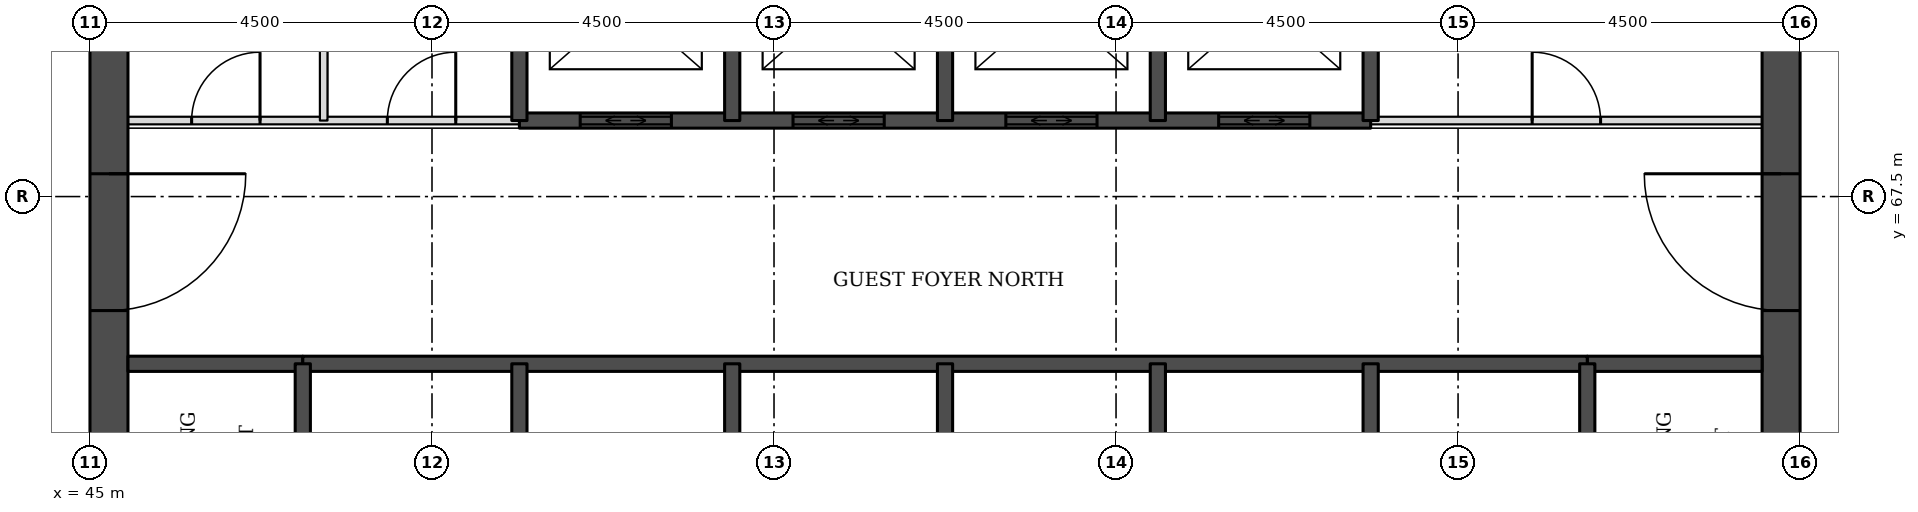
"""IFC4 building model, lengths in metres.
Left out: names, types, materials, properties, quantities, classifications, styles, units other than length and angle.
Written with IfcOpenShell. Run it as: python <this file> out.ifc"""

import sys

from ifc_helpers import new_model, si_unit, direction, frame, frame_2d, origin, place, context, subcontext, project, spatial, rectangle, extrude, element, fill, save


model = new_model("IFC4")
c1 = context("Model", 3, precision=1e-05, world=origin(), true_north=direction((0.0, 1.0)))
c2 = subcontext(c1, "Body", "Model", "MODEL_VIEW")
j1 = project(units=[si_unit("LENGTHUNIT", "METRE"), si_unit("PLANEANGLEUNIT", "RADIAN")], contexts=[c1])
p1 = place(None, origin())
s1 = spatial("IfcSite", under=j1, at=p1, CompositionType="ELEMENT")
p2 = place(p1, origin())
s2 = spatial("IfcBuilding", under=s1, at=p2, CompositionType="ELEMENT")
p3 = place(p2, frame((0.0, 0.0, 59.4)))
s3 = spatial("IfcBuildingStorey", under=s2, at=p3, CompositionType="ELEMENT", Elevation=59.4)
p4 = place(p3, frame((45.25, 49.5, 0.0), z_axis=(0.0, 0.0, 1.0), x_axis=(0.0, 1.0, 0.0)))
e1 = element("IfcWall", 1, at=p4, inside=s3, PredefinedType="SHEAR", context=c2, shape_type="SweptSolid", body=[
    extrude(rectangle(XDim=22.5, YDim=0.5, at=frame_2d((11.25, 0.0))), origin(), (0.0, 0.0, 1.0), 3.3),
])
p5 = place(p4, frame((4.2, 0.0, 0.0)))
e2 = element("IfcOpeningElement", 2, at=p5, cuts=e1, PredefinedType="OPENING", context=c2, shape_type="SweptSolid", body=[
    extrude(rectangle(XDim=1.8, YDim=2.1, at=frame_2d((0.9, 1.05))), frame((0.0, 0.26, 0.0), z_axis=(0.0, -1.0, 0.0), x_axis=(1.0, 0.0, 0.0)), (0.0, 0.0, 1.0), 0.52),
])
p6 = place(p4, frame((6.9, 0.0, 0.0)))
e3 = element("IfcOpeningElement", 3, at=p6, cuts=e1, PredefinedType="OPENING", context=c2, shape_type="SweptSolid", body=[
    extrude(rectangle(XDim=1.1, YDim=2.1, at=frame_2d((0.55, 1.05))), frame((0.0, 0.26, 0.0), z_axis=(0.0, -1.0, 0.0), x_axis=(1.0, 0.0, 0.0)), (0.0, 0.0, 1.0), 0.52),
])
p7 = place(p4, frame((13.6, 0.0, 0.0)))
e4 = element("IfcOpeningElement", 4, at=p7, cuts=e1, PredefinedType="OPENING", context=c2, shape_type="SweptSolid", body=[
    extrude(rectangle(XDim=1.1, YDim=2.1, at=frame_2d((0.55, 1.05))), frame((0.0, 0.26, 0.0), z_axis=(0.0, -1.0, 0.0), x_axis=(1.0, 0.0, 0.0)), (0.0, 0.0, 1.0), 0.52),
])
p8 = place(p4, frame((16.5, 0.0, 0.0)))
e5 = element("IfcOpeningElement", 5, at=p8, cuts=e1, PredefinedType="OPENING", context=c2, shape_type="SweptSolid", body=[
    extrude(rectangle(XDim=1.8, YDim=2.1, at=frame_2d((0.9, 1.05))), frame((0.0, 0.26, 0.0), z_axis=(0.0, -1.0, 0.0), x_axis=(1.0, 0.0, 0.0)), (0.0, 0.0, 1.0), 0.52),
])
p9 = place(p3, frame((67.25, 49.5, 0.0), z_axis=(0.0, 0.0, 1.0), x_axis=(0.0, 1.0, 0.0)))
e6 = element("IfcWall", 6, at=p9, inside=s3, PredefinedType="SHEAR", context=c2, shape_type="SweptSolid", body=[
    extrude(rectangle(XDim=22.5, YDim=0.5, at=frame_2d((11.25, 0.0))), origin(), (0.0, 0.0, 1.0), 3.3),
])
p10 = place(p9, frame((4.2, 0.0, 0.0)))
e7 = element("IfcOpeningElement", 7, at=p10, cuts=e6, PredefinedType="OPENING", context=c2, shape_type="SweptSolid", body=[
    extrude(rectangle(XDim=1.8, YDim=2.1, at=frame_2d((0.9, 1.05))), frame((0.0, 0.26, 0.0), z_axis=(0.0, -1.0, 0.0), x_axis=(1.0, 0.0, 0.0)), (0.0, 0.0, 1.0), 0.52),
])
p11 = place(p9, frame((6.9, 0.0, 0.0)))
e8 = element("IfcOpeningElement", 8, at=p11, cuts=e6, PredefinedType="OPENING", context=c2, shape_type="SweptSolid", body=[
    extrude(rectangle(XDim=1.1, YDim=2.1, at=frame_2d((0.55, 1.05))), frame((0.0, 0.26, 0.0), z_axis=(0.0, -1.0, 0.0), x_axis=(1.0, 0.0, 0.0)), (0.0, 0.0, 1.0), 0.52),
])
p12 = place(p9, frame((13.6, 0.0, 0.0)))
e9 = element("IfcOpeningElement", 9, at=p12, cuts=e6, PredefinedType="OPENING", context=c2, shape_type="SweptSolid", body=[
    extrude(rectangle(XDim=1.1, YDim=2.1, at=frame_2d((0.55, 1.05))), frame((0.0, 0.26, 0.0), z_axis=(0.0, -1.0, 0.0), x_axis=(1.0, 0.0, 0.0)), (0.0, 0.0, 1.0), 0.52),
])
p13 = place(p9, frame((16.5, 0.0, 0.0)))
e10 = element("IfcOpeningElement", 10, at=p13, cuts=e6, PredefinedType="OPENING", context=c2, shape_type="SweptSolid", body=[
    extrude(rectangle(XDim=1.8, YDim=2.1, at=frame_2d((0.9, 1.05))), frame((0.0, 0.26, 0.0), z_axis=(0.0, -1.0, 0.0), x_axis=(1.0, 0.0, 0.0)), (0.0, 0.0, 1.0), 0.52),
])
for number, where, z_axis, x_axis in (
    (11, (45.5, 65.3, 0.0), (0.0, 0.0, 1.0), (1.0, 0.0, 0.0)),
    (12, (64.7, 65.3, 0.0), (0.0, 0.0, 1.0), (1.0, 0.0, 0.0)),
):
    element("IfcWall", number, at=place(p3, frame(where, z_axis=z_axis, x_axis=x_axis)), inside=s3, PredefinedType="SOLIDWALL", context=c2, shape_type="SweptSolid", body=[
        extrude(rectangle(XDim=2.3, YDim=0.2, at=frame_2d((1.15, 0.0))), origin(), (0.0, 0.0, 1.0), 3.08),
    ])
p14 = place(p3, frame((47.8, 65.3, 0.0), z_axis=(0.0, 0.0, 1.0), x_axis=(1.0, 0.0, 0.0)))
e13 = element("IfcWall", 13, at=p14, inside=s3, PredefinedType="SOLIDWALL", context=c2, shape_type="SweptSolid", body=[
    extrude(rectangle(XDim=16.9, YDim=0.2, at=frame_2d((8.45, 0.0))), origin(), (0.0, 0.0, 1.0), 3.08),
])
p15 = place(p3, frame((45.5, 68.5, 0.0), z_axis=(0.0, 0.0, 1.0), x_axis=(1.0, 0.0, 0.0)))
e14 = element("IfcWall", 14, at=p15, inside=s3, PredefinedType="PARTITIONING", context=c2, shape_type="SweptSolid", body=[
    extrude(rectangle(XDim=5.15, YDim=0.1, at=frame_2d((2.575, 0.0))), origin(), (0.0, 0.0, 1.0), 3.08),
])
p16 = place(p15, frame((0.837, 0.0, 0.0)))
e15 = element("IfcOpeningElement", 15, at=p16, cuts=e14, PredefinedType="OPENING", context=c2, shape_type="SweptSolid", body=[
    extrude(rectangle(XDim=0.9, YDim=2.1, at=frame_2d((0.45, 1.05))), frame((0.0, 0.06, 0.0), z_axis=(0.0, -1.0, 0.0), x_axis=(1.0, 0.0, 0.0)), (0.0, 0.0, 1.0), 0.12),
])
p17 = place(p15, frame((3.413, 0.0, 0.0)))
e16 = element("IfcOpeningElement", 16, at=p17, cuts=e14, PredefinedType="OPENING", context=c2, shape_type="SweptSolid", body=[
    extrude(rectangle(XDim=0.9, YDim=2.1, at=frame_2d((0.45, 1.05))), frame((0.0, 0.06, 0.0), z_axis=(0.0, -1.0, 0.0), x_axis=(1.0, 0.0, 0.0)), (0.0, 0.0, 1.0), 0.12),
])
p18 = place(p3, frame((61.85, 68.5, 0.0), z_axis=(0.0, 0.0, 1.0), x_axis=(1.0, 0.0, 0.0)))
e17 = element("IfcWall", 17, at=p18, inside=s3, PredefinedType="PARTITIONING", context=c2, shape_type="SweptSolid", body=[
    extrude(rectangle(XDim=5.15, YDim=0.1, at=frame_2d((2.575, 0.0))), origin(), (0.0, 0.0, 1.0), 3.08),
])
p19 = place(p18, frame((2.125, 0.0, 0.0)))
e18 = element("IfcOpeningElement", 18, at=p19, cuts=e17, PredefinedType="OPENING", context=c2, shape_type="SweptSolid", body=[
    extrude(rectangle(XDim=0.9, YDim=2.1, at=frame_2d((0.45, 1.05))), frame((0.0, 0.06, 0.0), z_axis=(0.0, -1.0, 0.0), x_axis=(1.0, 0.0, 0.0)), (0.0, 0.0, 1.0), 0.12),
])
p20 = place(p3, frame((50.65, 68.5, 0.0), z_axis=(0.0, 0.0, 1.0), x_axis=(1.0, 0.0, 0.0)))
e19 = element("IfcWall", 19, at=p20, inside=s3, PredefinedType="SOLIDWALL", context=c2, shape_type="SweptSolid", body=[
    extrude(rectangle(XDim=11.2, YDim=0.2, at=frame_2d((5.6, 0.0))), origin(), (0.0, 0.0, 1.0), 3.08),
])
p21 = place(p20, frame((0.8, 0.0, 0.0)))
e20 = element("IfcOpeningElement", 20, at=p21, cuts=e19, PredefinedType="OPENING", context=c2, shape_type="SweptSolid", body=[
    extrude(rectangle(XDim=1.2, YDim=2.1, at=frame_2d((0.6, 1.05))), frame((0.0, 0.11, 0.0), z_axis=(0.0, -1.0, 0.0), x_axis=(1.0, 0.0, 0.0)), (0.0, 0.0, 1.0), 0.22),
])
p22 = place(p20, frame((3.6, 0.0, 0.0)))
e21 = element("IfcOpeningElement", 21, at=p22, cuts=e19, PredefinedType="OPENING", context=c2, shape_type="SweptSolid", body=[
    extrude(rectangle(XDim=1.2, YDim=2.1, at=frame_2d((0.6, 1.05))), frame((0.0, 0.11, 0.0), z_axis=(0.0, -1.0, 0.0), x_axis=(1.0, 0.0, 0.0)), (0.0, 0.0, 1.0), 0.22),
])
p23 = place(p20, frame((6.4, 0.0, 0.0)))
e22 = element("IfcOpeningElement", 22, at=p23, cuts=e19, PredefinedType="OPENING", context=c2, shape_type="SweptSolid", body=[
    extrude(rectangle(XDim=1.2, YDim=2.1, at=frame_2d((0.6, 1.05))), frame((0.0, 0.11, 0.0), z_axis=(0.0, -1.0, 0.0), x_axis=(1.0, 0.0, 0.0)), (0.0, 0.0, 1.0), 0.22),
])
p24 = place(p20, frame((9.2, 0.0, 0.0)))
e23 = element("IfcOpeningElement", 23, at=p24, cuts=e19, PredefinedType="OPENING", context=c2, shape_type="SweptSolid", body=[
    extrude(rectangle(XDim=1.2, YDim=2.1, at=frame_2d((0.6, 1.05))), frame((0.0, 0.11, 0.0), z_axis=(0.0, -1.0, 0.0), x_axis=(1.0, 0.0, 0.0)), (0.0, 0.0, 1.0), 0.22),
])
p25 = place(p3, frame((47.8, 62.0, 0.0), z_axis=(0.0, 0.0, 1.0), x_axis=(0.0, 1.0, 0.0)))
e24 = element("IfcWall", 24, at=p25, inside=s3, PredefinedType="SOLIDWALL", context=c2, shape_type="SweptSolid", body=[
    extrude(rectangle(XDim=3.3, YDim=0.2, at=frame_2d((1.65, 0.0))), origin(), (0.0, 0.0, 1.0), 3.08),
])
p26 = place(p25, frame((1.1, 0.0, 0.0)))
e25 = element("IfcOpeningElement", 25, at=p26, cuts=e24, PredefinedType="OPENING", context=c2, shape_type="SweptSolid", body=[
    extrude(rectangle(XDim=1.1, YDim=2.1, at=frame_2d((0.55, 1.05))), frame((0.0, 0.11, 0.0), z_axis=(0.0, -1.0, 0.0), x_axis=(1.0, 0.0, 0.0)), (0.0, 0.0, 1.0), 0.22),
])
p27 = place(p3, frame((48.075, 68.5, 0.0), z_axis=(0.0, 0.0, 1.0), x_axis=(0.0, 1.0, 0.0)))
e26 = element("IfcWall", 26, at=p27, inside=s3, PredefinedType="PARTITIONING", context=c2, shape_type="SweptSolid", body=[
    extrude(rectangle(XDim=3.0, YDim=0.1, at=frame_2d((1.5, 0.0))), origin(), (0.0, 0.0, 1.0), 3.08),
])
p28 = place(p3, frame((50.65, 62.0, 0.0), z_axis=(0.0, 0.0, 1.0), x_axis=(0.0, 1.0, 0.0)))
e27 = element("IfcWall", 27, at=p28, inside=s3, PredefinedType="SOLIDWALL", context=c2, shape_type="SweptSolid", body=[
    extrude(rectangle(XDim=3.3, YDim=0.2, at=frame_2d((1.65, 0.0))), origin(), (0.0, 0.0, 1.0), 3.08),
])
p29 = place(p3, frame((50.65, 68.5, 0.0), z_axis=(0.0, 0.0, 1.0), x_axis=(0.0, 1.0, 0.0)))
e28 = element("IfcWall", 28, at=p29, inside=s3, PredefinedType="SOLIDWALL", context=c2, shape_type="SweptSolid", body=[
    extrude(rectangle(XDim=3.0, YDim=0.2, at=frame_2d((1.5, 0.0))), origin(), (0.0, 0.0, 1.0), 3.08),
])
p30 = place(p3, frame((53.45, 62.5, 0.0), z_axis=(0.0, 0.0, 1.0), x_axis=(0.0, 1.0, 0.0)))
e29 = element("IfcWall", 29, at=p30, inside=s3, PredefinedType="SOLIDWALL", context=c2, shape_type="SweptSolid", body=[
    extrude(rectangle(XDim=2.8, YDim=0.2, at=frame_2d((1.4, 0.0))), origin(), (0.0, 0.0, 1.0), 3.08),
])
p31 = place(p3, frame((53.45, 68.5, 0.0), z_axis=(0.0, 0.0, 1.0), x_axis=(0.0, 1.0, 0.0)))
e30 = element("IfcWall", 30, at=p31, inside=s3, PredefinedType="SOLIDWALL", context=c2, shape_type="SweptSolid", body=[
    extrude(rectangle(XDim=3.0, YDim=0.2, at=frame_2d((1.5, 0.0))), origin(), (0.0, 0.0, 1.0), 3.08),
])
p32 = place(p3, frame((56.25, 62.5, 0.0), z_axis=(0.0, 0.0, 1.0), x_axis=(0.0, 1.0, 0.0)))
e31 = element("IfcWall", 31, at=p32, inside=s3, PredefinedType="SOLIDWALL", context=c2, shape_type="SweptSolid", body=[
    extrude(rectangle(XDim=2.8, YDim=0.2, at=frame_2d((1.4, 0.0))), origin(), (0.0, 0.0, 1.0), 3.08),
])
p33 = place(p3, frame((56.25, 68.5, 0.0), z_axis=(0.0, 0.0, 1.0), x_axis=(0.0, 1.0, 0.0)))
e32 = element("IfcWall", 32, at=p33, inside=s3, PredefinedType="SOLIDWALL", context=c2, shape_type="SweptSolid", body=[
    extrude(rectangle(XDim=3.0, YDim=0.2, at=frame_2d((1.5, 0.0))), origin(), (0.0, 0.0, 1.0), 3.08),
])
p34 = place(p3, frame((59.05, 62.5, 0.0), z_axis=(0.0, 0.0, 1.0), x_axis=(0.0, 1.0, 0.0)))
e33 = element("IfcWall", 33, at=p34, inside=s3, PredefinedType="SOLIDWALL", context=c2, shape_type="SweptSolid", body=[
    extrude(rectangle(XDim=2.8, YDim=0.2, at=frame_2d((1.4, 0.0))), origin(), (0.0, 0.0, 1.0), 3.08),
])
p35 = place(p3, frame((59.05, 68.5, 0.0), z_axis=(0.0, 0.0, 1.0), x_axis=(0.0, 1.0, 0.0)))
e34 = element("IfcWall", 34, at=p35, inside=s3, PredefinedType="SOLIDWALL", context=c2, shape_type="SweptSolid", body=[
    extrude(rectangle(XDim=3.0, YDim=0.2, at=frame_2d((1.5, 0.0))), origin(), (0.0, 0.0, 1.0), 3.08),
])
p36 = place(p3, frame((61.85, 62.0, 0.0), z_axis=(0.0, 0.0, 1.0), x_axis=(0.0, 1.0, 0.0)))
e35 = element("IfcWall", 35, at=p36, inside=s3, PredefinedType="SOLIDWALL", context=c2, shape_type="SweptSolid", body=[
    extrude(rectangle(XDim=3.3, YDim=0.2, at=frame_2d((1.65, 0.0))), origin(), (0.0, 0.0, 1.0), 3.08),
])
p37 = place(p3, frame((61.85, 68.5, 0.0), z_axis=(0.0, 0.0, 1.0), x_axis=(0.0, 1.0, 0.0)))
e36 = element("IfcWall", 36, at=p37, inside=s3, PredefinedType="SOLIDWALL", context=c2, shape_type="SweptSolid", body=[
    extrude(rectangle(XDim=3.0, YDim=0.2, at=frame_2d((1.5, 0.0))), origin(), (0.0, 0.0, 1.0), 3.08),
])
p38 = place(p3, frame((64.7, 62.0, 0.0), z_axis=(0.0, 0.0, 1.0), x_axis=(0.0, 1.0, 0.0)))
e37 = element("IfcWall", 37, at=p38, inside=s3, PredefinedType="SOLIDWALL", context=c2, shape_type="SweptSolid", body=[
    extrude(rectangle(XDim=3.3, YDim=0.2, at=frame_2d((1.65, 0.0))), origin(), (0.0, 0.0, 1.0), 3.08),
])
p39 = place(p38, frame((1.1, 0.0, 0.0)))
e38 = element("IfcOpeningElement", 38, at=p39, cuts=e37, PredefinedType="OPENING", context=c2, shape_type="SweptSolid", body=[
    extrude(rectangle(XDim=1.1, YDim=2.1, at=frame_2d((0.55, 1.05))), frame((0.0, 0.11, 0.0), z_axis=(0.0, -1.0, 0.0), x_axis=(1.0, 0.0, 0.0)), (0.0, 0.0, 1.0), 0.22),
])
p40 = place(p21, origin())
e39 = element("IfcDoor", 39, at=p40, inside=s3, OperationType="DOUBLE_DOOR_SLIDING", PredefinedType="DOOR", context=c2, shape_type="SweptSolid", body=[
    extrude(rectangle(XDim=1.2, YDim=2.1, at=frame_2d((0.6, 1.05))), frame((0.0, 0.025, 0.0), z_axis=(0.0, -1.0, 0.0), x_axis=(1.0, 0.0, 0.0)), (0.0, 0.0, 1.0), 0.05),
])
fill(e20, e39)
p41 = place(p22, origin())
e40 = element("IfcDoor", 40, at=p41, inside=s3, OperationType="DOUBLE_DOOR_SLIDING", PredefinedType="DOOR", context=c2, shape_type="SweptSolid", body=[
    extrude(rectangle(XDim=1.2, YDim=2.1, at=frame_2d((0.6, 1.05))), frame((0.0, 0.025, 0.0), z_axis=(0.0, -1.0, 0.0), x_axis=(1.0, 0.0, 0.0)), (0.0, 0.0, 1.0), 0.05),
])
fill(e21, e40)
p42 = place(p23, origin())
e41 = element("IfcDoor", 41, at=p42, inside=s3, OperationType="DOUBLE_DOOR_SLIDING", PredefinedType="DOOR", context=c2, shape_type="SweptSolid", body=[
    extrude(rectangle(XDim=1.2, YDim=2.1, at=frame_2d((0.6, 1.05))), frame((0.0, 0.025, 0.0), z_axis=(0.0, -1.0, 0.0), x_axis=(1.0, 0.0, 0.0)), (0.0, 0.0, 1.0), 0.05),
])
fill(e22, e41)
p43 = place(p24, origin())
e42 = element("IfcDoor", 42, at=p43, inside=s3, OperationType="DOUBLE_DOOR_SLIDING", PredefinedType="DOOR", context=c2, shape_type="SweptSolid", body=[
    extrude(rectangle(XDim=1.2, YDim=2.1, at=frame_2d((0.6, 1.05))), frame((0.0, 0.025, 0.0), z_axis=(0.0, -1.0, 0.0), x_axis=(1.0, 0.0, 0.0)), (0.0, 0.0, 1.0), 0.05),
])
fill(e23, e42)
p44 = place(p8, frame((1.8, 0.0, 0.0), z_axis=(0.0, 0.0, 1.0), x_axis=(-1.0, 0.0, 0.0)))
e43 = element("IfcDoor", 43, at=p44, inside=s3, OperationType="SINGLE_SWING_LEFT", PredefinedType="DOOR", context=c2, shape_type="SweptSolid", body=[
    extrude(rectangle(XDim=1.8, YDim=2.1, at=frame_2d((0.9, 1.05))), frame((0.0, 0.025, 0.0), z_axis=(0.0, -1.0, 0.0), x_axis=(1.0, 0.0, 0.0)), (0.0, 0.0, 1.0), 0.05),
])
fill(e5, e43)
p45 = place(p13, origin())
e44 = element("IfcDoor", 44, at=p45, inside=s3, OperationType="SINGLE_SWING_RIGHT", PredefinedType="DOOR", context=c2, shape_type="SweptSolid", body=[
    extrude(rectangle(XDim=1.8, YDim=2.1, at=frame_2d((0.9, 1.05))), frame((0.0, 0.025, 0.0), z_axis=(0.0, -1.0, 0.0), x_axis=(1.0, 0.0, 0.0)), (0.0, 0.0, 1.0), 0.05),
])
fill(e10, e44)
p46 = place(p19, origin())
e45 = element("IfcDoor", 45, at=p46, inside=s3, OperationType="SINGLE_SWING_LEFT", PredefinedType="DOOR", context=c2, shape_type="SweptSolid", body=[
    extrude(rectangle(XDim=0.9, YDim=2.1, at=frame_2d((0.45, 1.05))), frame((0.0, 0.025, 0.0), z_axis=(0.0, -1.0, 0.0), x_axis=(1.0, 0.0, 0.0)), (0.0, 0.0, 1.0), 0.05),
])
fill(e18, e45)
p47 = place(p16, origin())
e46 = element("IfcDoor", 46, at=p47, inside=s3, OperationType="SINGLE_SWING_RIGHT", PredefinedType="DOOR", context=c2, shape_type="SweptSolid", body=[
    extrude(rectangle(XDim=0.9, YDim=2.1, at=frame_2d((0.45, 1.05))), frame((0.0, 0.025, 0.0), z_axis=(0.0, -1.0, 0.0), x_axis=(1.0, 0.0, 0.0)), (0.0, 0.0, 1.0), 0.05),
])
fill(e15, e46)
p48 = place(p17, origin())
e47 = element("IfcDoor", 47, at=p48, inside=s3, OperationType="SINGLE_SWING_RIGHT", PredefinedType="DOOR", context=c2, shape_type="SweptSolid", body=[
    extrude(rectangle(XDim=0.9, YDim=2.1, at=frame_2d((0.45, 1.05))), frame((0.0, 0.025, 0.0), z_axis=(0.0, -1.0, 0.0), x_axis=(1.0, 0.0, 0.0)), (0.0, 0.0, 1.0), 0.05),
])
fill(e16, e47)
save(model, sys.argv[1])
